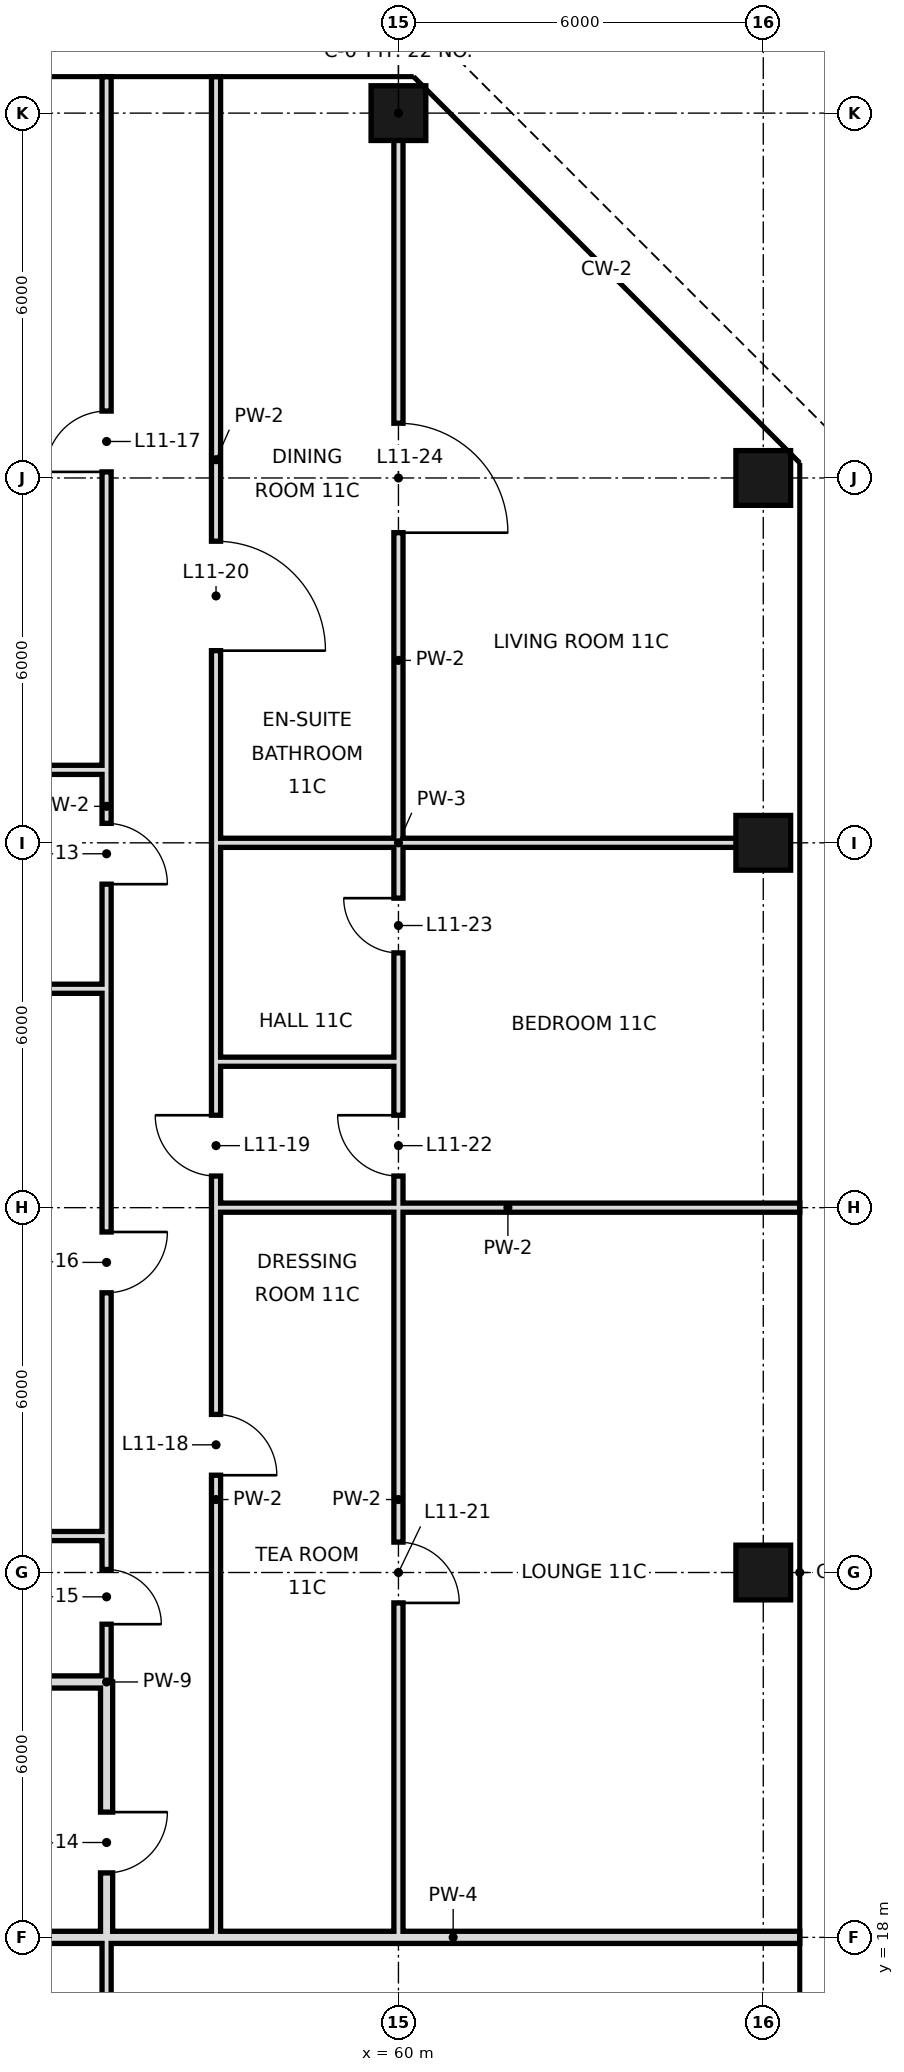
"""IFC4 building model, lengths in metres.
Left out: names, types, materials, properties, quantities, classifications, styles, units other than length and angle.
Written with IfcOpenShell. Run it as: python <this file> out.ifc"""

import sys

from ifc_helpers import new_model, si_unit, direction, frame, frame_2d, origin, origin_2d, place, context, subcontext, project, spatial, rectangle, hollow_rectangle, extrude, element, fill, save


model = new_model("IFC4")
c1 = context("Model", 3, precision=1e-05, world=origin(), true_north=direction((0.0, 1.0)))
c2 = subcontext(c1, "Body", "Model", "MODEL_VIEW")
j1 = project(units=[si_unit("LENGTHUNIT", "METRE"), si_unit("PLANEANGLEUNIT", "RADIAN")], contexts=[c1])
p1 = place(None, origin())
s1 = spatial("IfcSite", under=j1, at=p1, CompositionType="ELEMENT")
p2 = place(p1, origin())
s2 = spatial("IfcBuilding", under=s1, at=p2, CompositionType="ELEMENT")
p3 = place(p2, frame((0.0, 0.0, 60.6)))
s3 = spatial("IfcBuildingStorey", under=s2, at=p3, CompositionType="ELEMENT", Elevation=60.6)
for number, where, z_axis, x_axis in (
    (1, (60.0, 48.0, 0.0), (0.0, 0.0, 1.0), (1.0, 0.0, 0.0)),
    (2, (66.0, 24.0, 0.0), (0.0, 0.0, 1.0), (1.0, 0.0, 0.0)),
    (3, (66.0, 36.0, 0.0), (0.0, 0.0, 1.0), (1.0, 0.0, 0.0)),
    (4, (66.0, 42.0, 0.0), (0.0, 0.0, 1.0), (1.0, 0.0, 0.0)),
):
    element("IfcColumn", number, at=place(p3, frame(where, z_axis=z_axis, x_axis=x_axis)), inside=s3, PredefinedType="COLUMN", context=c2, shape_type="SweptSolid", body=[
        extrude(hollow_rectangle(XDim=0.9, YDim=0.9, WallThickness=0.045, at=origin_2d()), origin(), (0.0, 0.0, 1.0), 3.6),
    ])
p4 = place(p3, frame((55.2, 18.0, 0.0), z_axis=(0.0, 0.0, 1.0), x_axis=(0.0, 1.0, 0.0)))
e5 = element("IfcWall", 5, at=p4, inside=s3, PredefinedType="SOLIDWALL", context=c2, shape_type="SweptSolid", body=[
    extrude(rectangle(XDim=4.2, YDim=0.2, at=frame_2d((2.1, 0.0))), origin(), (0.0, 0.0, 1.0), 2.52),
])
p5 = place(p4, frame((1.06, 0.0, 0.0)))
e6 = element("IfcOpeningElement", 6, at=p5, cuts=e5, PredefinedType="OPENING", context=c2, shape_type="SweptSolid", body=[
    extrude(rectangle(XDim=1.0, YDim=2.4, at=frame_2d((0.5, 1.2))), frame((0.0, 0.11, 0.0), z_axis=(0.0, -1.0, 0.0), x_axis=(1.0, 0.0, 0.0)), (0.0, 0.0, 1.0), 0.22),
])
p6 = place(p3, frame((55.2, 10.8, 0.0), z_axis=(0.0, 0.0, 1.0), x_axis=(0.0, 1.0, 0.0)))
e7 = element("IfcWall", 7, at=p6, inside=s3, PredefinedType="PARTITIONING", context=c2, shape_type="SweptSolid", body=[
    extrude(rectangle(XDim=7.2, YDim=0.15, at=frame_2d((3.6, 0.0))), origin(), (0.0, 0.0, 1.0), 3.42),
])
p7 = place(p3, frame((55.2, 24.6, 0.0), z_axis=(0.0, 0.0, 1.0), x_axis=(0.0, 1.0, 0.0)))
e8 = element("IfcWall", 8, at=p7, inside=s3, PredefinedType="PARTITIONING", context=c2, shape_type="SweptSolid", body=[
    extrude(rectangle(XDim=24.0, YDim=0.15, at=frame_2d((12.0, 0.0))), origin(), (0.0, 0.0, 1.0), 3.42),
])
p8 = place(p7, frame((10.72, 0.0, 0.0)))
e9 = element("IfcOpeningElement", 9, at=p8, cuts=e8, PredefinedType="OPENING", context=c2, shape_type="SweptSolid", body=[
    extrude(rectangle(XDim=1.0, YDim=2.4, at=frame_2d((0.5, 1.2))), frame((0.0, 0.085, 0.0), z_axis=(0.0, -1.0, 0.0), x_axis=(1.0, 0.0, 0.0)), (0.0, 0.0, 1.0), 0.17),
])
p9 = place(p7, frame((4.0, 0.0, 0.0)))
e10 = element("IfcOpeningElement", 10, at=p9, cuts=e8, PredefinedType="OPENING", context=c2, shape_type="SweptSolid", body=[
    extrude(rectangle(XDim=1.0, YDim=2.4, at=frame_2d((0.5, 1.2))), frame((0.0, 0.085, 0.0), z_axis=(0.0, -1.0, 0.0), x_axis=(1.0, 0.0, 0.0)), (0.0, 0.0, 1.0), 0.17),
])
p10 = place(p7, frame((17.5, 0.0, 0.0)))
e11 = element("IfcOpeningElement", 11, at=p10, cuts=e8, PredefinedType="OPENING", context=c2, shape_type="SweptSolid", body=[
    extrude(rectangle(XDim=1.0, YDim=2.4, at=frame_2d((0.5, 1.2))), frame((0.0, 0.085, 0.0), z_axis=(0.0, -1.0, 0.0), x_axis=(1.0, 0.0, 0.0)), (0.0, 0.0, 1.0), 0.17),
])
p11 = place(p3, frame((55.2, 22.2, 0.0), z_axis=(0.0, 0.0, 1.0), x_axis=(0.0, 1.0, 0.0)))
e12 = element("IfcWall", 12, at=p11, inside=s3, PredefinedType="PARTITIONING", context=c2, shape_type="SweptSolid", body=[
    extrude(rectangle(XDim=2.4, YDim=0.15, at=frame_2d((1.2, 0.0))), origin(), (0.0, 0.0, 1.0), 3.42),
])
p12 = place(p11, frame((0.95, 0.0, 0.0)))
e13 = element("IfcOpeningElement", 13, at=p12, cuts=e12, PredefinedType="OPENING", context=c2, shape_type="SweptSolid", body=[
    extrude(rectangle(XDim=0.9, YDim=2.4, at=frame_2d((0.45, 1.2))), frame((0.0, 0.085, 0.0), z_axis=(0.0, -1.0, 0.0), x_axis=(1.0, 0.0, 0.0)), (0.0, 0.0, 1.0), 0.17),
])
p13 = place(p3, frame((57.0, 18.0, 0.0), z_axis=(0.0, 0.0, 1.0), x_axis=(0.0, 1.0, 0.0)))
e14 = element("IfcWall", 14, at=p13, inside=s3, PredefinedType="PARTITIONING", context=c2, shape_type="SweptSolid", body=[
    extrude(rectangle(XDim=14.4, YDim=0.15, at=frame_2d((7.2, 0.0))), origin(), (0.0, 0.0, 1.0), 3.42),
])
p14 = place(p13, frame((7.6, 0.0, 0.0)))
e15 = element("IfcOpeningElement", 15, at=p14, cuts=e14, PredefinedType="OPENING", context=c2, shape_type="SweptSolid", body=[
    extrude(rectangle(XDim=1.0, YDim=2.4, at=frame_2d((0.5, 1.2))), frame((0.0, 0.085, 0.0), z_axis=(0.0, -1.0, 0.0), x_axis=(1.0, 0.0, 0.0)), (0.0, 0.0, 1.0), 0.17),
])
p15 = place(p13, frame((12.52, 0.0, 0.0)))
e16 = element("IfcOpeningElement", 16, at=p15, cuts=e14, PredefinedType="OPENING", context=c2, shape_type="SweptSolid", body=[
    extrude(rectangle(XDim=1.0, YDim=2.4, at=frame_2d((0.5, 1.2))), frame((0.0, 0.085, 0.0), z_axis=(0.0, -1.0, 0.0), x_axis=(1.0, 0.0, 0.0)), (0.0, 0.0, 1.0), 0.17),
])
p16 = place(p3, frame((57.0, 36.0, 0.0), z_axis=(0.0, 0.0, 1.0), x_axis=(0.0, 1.0, 0.0)))
e17 = element("IfcWall", 17, at=p16, inside=s3, PredefinedType="PARTITIONING", context=c2, shape_type="SweptSolid", body=[
    extrude(rectangle(XDim=12.6, YDim=0.15, at=frame_2d((6.3, 0.0))), origin(), (0.0, 0.0, 1.0), 3.42),
])
p17 = place(p16, frame((3.16, 0.0, 0.0)))
e18 = element("IfcOpeningElement", 18, at=p17, cuts=e17, PredefinedType="OPENING", context=c2, shape_type="SweptSolid", body=[
    extrude(rectangle(XDim=1.8, YDim=2.4, at=frame_2d((0.9, 1.2))), frame((0.0, 0.085, 0.0), z_axis=(0.0, -1.0, 0.0), x_axis=(1.0, 0.0, 0.0)), (0.0, 0.0, 1.0), 0.17),
])
p18 = place(p3, frame((57.0, 32.4, 0.0), z_axis=(0.0, 0.0, 1.0), x_axis=(0.0, 1.0, 0.0)))
e19 = element("IfcWall", 19, at=p18, inside=s3, PredefinedType="PARTITIONING", context=c2, shape_type="SweptSolid", body=[
    extrude(rectangle(XDim=3.6, YDim=0.15, at=frame_2d((1.8, 0.0))), origin(), (0.0, 0.0, 1.0), 3.42),
])
p19 = place(p3, frame((60.0, 18.0, 0.0), z_axis=(0.0, 0.0, 1.0), x_axis=(0.0, 1.0, 0.0)))
e20 = element("IfcWall", 20, at=p19, inside=s3, PredefinedType="PARTITIONING", context=c2, shape_type="SweptSolid", body=[
    extrude(rectangle(XDim=14.4, YDim=0.15, at=frame_2d((7.2, 0.0))), origin(), (0.0, 0.0, 1.0), 3.42),
])
p20 = place(p19, frame((5.5, 0.0, 0.0)))
e21 = element("IfcOpeningElement", 21, at=p20, cuts=e20, PredefinedType="OPENING", context=c2, shape_type="SweptSolid", body=[
    extrude(rectangle(XDim=1.0, YDim=2.4, at=frame_2d((0.5, 1.2))), frame((0.0, 0.085, 0.0), z_axis=(0.0, -1.0, 0.0), x_axis=(1.0, 0.0, 0.0)), (0.0, 0.0, 1.0), 0.17),
])
p21 = place(p19, frame((12.52, 0.0, 0.0)))
e22 = element("IfcOpeningElement", 22, at=p21, cuts=e20, PredefinedType="OPENING", context=c2, shape_type="SweptSolid", body=[
    extrude(rectangle(XDim=1.0, YDim=2.4, at=frame_2d((0.5, 1.2))), frame((0.0, 0.085, 0.0), z_axis=(0.0, -1.0, 0.0), x_axis=(1.0, 0.0, 0.0)), (0.0, 0.0, 1.0), 0.17),
])
p22 = place(p3, frame((60.0, 36.0, 0.0), z_axis=(0.0, 0.0, 1.0), x_axis=(0.0, 1.0, 0.0)))
e23 = element("IfcWall", 23, at=p22, inside=s3, PredefinedType="PARTITIONING", context=c2, shape_type="SweptSolid", body=[
    extrude(rectangle(XDim=12.0, YDim=0.15, at=frame_2d((6.0, 0.0))), origin(), (0.0, 0.0, 1.0), 3.42),
])
p23 = place(p22, frame((5.1, 0.0, 0.0)))
e24 = element("IfcOpeningElement", 24, at=p23, cuts=e23, PredefinedType="OPENING", context=c2, shape_type="SweptSolid", body=[
    extrude(rectangle(XDim=1.8, YDim=2.4, at=frame_2d((0.9, 1.2))), frame((0.0, 0.085, 0.0), z_axis=(0.0, -1.0, 0.0), x_axis=(1.0, 0.0, 0.0)), (0.0, 0.0, 1.0), 0.17),
])
p24 = place(p3, frame((60.0, 32.4, 0.0), z_axis=(0.0, 0.0, 1.0), x_axis=(0.0, 1.0, 0.0)))
e25 = element("IfcWall", 25, at=p24, inside=s3, PredefinedType="PARTITIONING", context=c2, shape_type="SweptSolid", body=[
    extrude(rectangle(XDim=3.6, YDim=0.15, at=frame_2d((1.8, 0.0))), origin(), (0.0, 0.0, 1.0), 3.42),
])
p25 = place(p24, frame((1.79, 0.0, 0.0)))
e26 = element("IfcOpeningElement", 26, at=p25, cuts=e25, PredefinedType="OPENING", context=c2, shape_type="SweptSolid", body=[
    extrude(rectangle(XDim=0.9, YDim=2.4, at=frame_2d((0.45, 1.2))), frame((0.0, 0.085, 0.0), z_axis=(0.0, -1.0, 0.0), x_axis=(1.0, 0.0, 0.0)), (0.0, 0.0, 1.0), 0.17),
])
p26 = place(p3, frame((44.9, 18.0, 0.0), z_axis=(0.0, 0.0, 1.0), x_axis=(1.0, 0.0, 0.0)))
e27 = element("IfcWall", 27, at=p26, inside=s3, PredefinedType="SOLIDWALL", context=c2, shape_type="SweptSolid", body=[
    extrude(rectangle(XDim=10.3, YDim=0.2, at=frame_2d((5.15, 0.0))), origin(), (0.0, 0.0, 1.0), 2.52),
])
p27 = place(p3, frame((55.2, 18.0, 0.0), z_axis=(0.0, 0.0, 1.0), x_axis=(1.0, 0.0, 0.0)))
e28 = element("IfcWall", 28, at=p27, inside=s3, PredefinedType="SOLIDWALL", context=c2, shape_type="SweptSolid", body=[
    extrude(rectangle(XDim=11.4, YDim=0.2, at=frame_2d((5.7, 0.0))), origin(), (0.0, 0.0, 1.0), 2.52),
])
p28 = place(p3, frame((44.9, 22.2, 0.0), z_axis=(0.0, 0.0, 1.0), x_axis=(1.0, 0.0, 0.0)))
e29 = element("IfcWall", 29, at=p28, inside=s3, PredefinedType="SOLIDWALL", context=c2, shape_type="SweptSolid", body=[
    extrude(rectangle(XDim=10.3, YDim=0.2, at=frame_2d((5.15, 0.0))), origin(), (0.0, 0.0, 1.0), 2.72),
])
p29 = place(p3, frame((44.9, 24.6, 0.0), z_axis=(0.0, 0.0, 1.0), x_axis=(1.0, 0.0, 0.0)))
e30 = element("IfcWall", 30, at=p29, inside=s3, PredefinedType="PARTITIONING", context=c2, shape_type="SweptSolid", body=[
    extrude(rectangle(XDim=10.3, YDim=0.15, at=frame_2d((5.15, 0.0))), origin(), (0.0, 0.0, 1.0), 3.42),
])
p30 = place(p3, frame((57.0, 30.0, 0.0), z_axis=(0.0, 0.0, 1.0), x_axis=(1.0, 0.0, 0.0)))
e31 = element("IfcWall", 31, at=p30, inside=s3, PredefinedType="PARTITIONING", context=c2, shape_type="SweptSolid", body=[
    extrude(rectangle(XDim=9.6, YDim=0.15, at=frame_2d((4.8, 0.0))), origin(), (0.0, 0.0, 1.0), 2.52),
])
p31 = place(p3, frame((57.0, 32.4, 0.0), z_axis=(0.0, 0.0, 1.0), x_axis=(1.0, 0.0, 0.0)))
e32 = element("IfcWall", 32, at=p31, inside=s3, PredefinedType="PARTITIONING", context=c2, shape_type="SweptSolid", body=[
    extrude(rectangle(XDim=3.0, YDim=0.15, at=frame_2d((1.5, 0.0))), origin(), (0.0, 0.0, 1.0), 3.42),
])
p32 = place(p3, frame((44.9, 33.6, 0.0), z_axis=(0.0, 0.0, 1.0), x_axis=(1.0, 0.0, 0.0)))
e33 = element("IfcWall", 33, at=p32, inside=s3, PredefinedType="PARTITIONING", context=c2, shape_type="SweptSolid", body=[
    extrude(rectangle(XDim=10.3, YDim=0.15, at=frame_2d((5.15, 0.0))), origin(), (0.0, 0.0, 1.0), 3.42),
])
p33 = place(p3, frame((60.0, 36.0, 0.0), z_axis=(0.0, 0.0, 1.0), x_axis=(1.0, 0.0, 0.0)))
e34 = element("IfcWall", 34, at=p33, inside=s3, PredefinedType="PARTITIONING", context=c2, shape_type="SweptSolid", body=[
    extrude(rectangle(XDim=6.0, YDim=0.15, at=frame_2d((3.0, 0.0))), origin(), (0.0, 0.0, 1.0), 2.52),
])
p34 = place(p3, frame((57.0, 36.0, 0.0), z_axis=(0.0, 0.0, 1.0), x_axis=(1.0, 0.0, 0.0)))
e35 = element("IfcWall", 35, at=p34, inside=s3, PredefinedType="PARTITIONING", context=c2, shape_type="SweptSolid", body=[
    extrude(rectangle(XDim=3.0, YDim=0.15, at=frame_2d((1.5, 0.0))), origin(), (0.0, 0.0, 1.0), 2.52),
])
p35 = place(p3, frame((44.9, 37.2, 0.0), z_axis=(0.0, 0.0, 1.0), x_axis=(1.0, 0.0, 0.0)))
e36 = element("IfcWall", 36, at=p35, inside=s3, PredefinedType="PARTITIONING", context=c2, shape_type="SweptSolid", body=[
    extrude(rectangle(XDim=10.3, YDim=0.15, at=frame_2d((5.15, 0.0))), origin(), (0.0, 0.0, 1.0), 3.42),
])
p36 = place(p8, frame((1.0, 0.0, 0.0), z_axis=(0.0, 0.0, 1.0), x_axis=(-1.0, 0.0, 0.0)))
e37 = element("IfcDoor", 37, at=p36, inside=s3, OperationType="SINGLE_SWING_RIGHT", PredefinedType="DOOR", context=c2, shape_type="SweptSolid", body=[
    extrude(rectangle(XDim=1.0, YDim=2.4, at=frame_2d((0.5, 1.2))), frame((0.0, 0.025, 0.0), z_axis=(0.0, -1.0, 0.0), x_axis=(1.0, 0.0, 0.0)), (0.0, 0.0, 1.0), 0.05),
])
fill(e9, e37)
p37 = place(p5, origin())
e38 = element("IfcDoor", 38, at=p37, inside=s3, OperationType="SINGLE_SWING_RIGHT", PredefinedType="DOOR", context=c2, shape_type="SweptSolid", body=[
    extrude(rectangle(XDim=1.0, YDim=2.4, at=frame_2d((0.5, 1.2))), frame((0.0, 0.025, 0.0), z_axis=(0.0, -1.0, 0.0), x_axis=(1.0, 0.0, 0.0)), (0.0, 0.0, 1.0), 0.05),
])
fill(e6, e38)
p38 = place(p12, frame((0.9, 0.0, 0.0), z_axis=(0.0, 0.0, 1.0), x_axis=(-1.0, 0.0, 0.0)))
e39 = element("IfcDoor", 39, at=p38, inside=s3, OperationType="SINGLE_SWING_RIGHT", PredefinedType="DOOR", context=c2, shape_type="SweptSolid", body=[
    extrude(rectangle(XDim=0.9, YDim=2.4, at=frame_2d((0.45, 1.2))), frame((0.0, 0.025, 0.0), z_axis=(0.0, -1.0, 0.0), x_axis=(1.0, 0.0, 0.0)), (0.0, 0.0, 1.0), 0.05),
])
fill(e13, e39)
p39 = place(p9, origin())
e40 = element("IfcDoor", 40, at=p39, inside=s3, OperationType="SINGLE_SWING_RIGHT", PredefinedType="DOOR", context=c2, shape_type="SweptSolid", body=[
    extrude(rectangle(XDim=1.0, YDim=2.4, at=frame_2d((0.5, 1.2))), frame((0.0, 0.025, 0.0), z_axis=(0.0, -1.0, 0.0), x_axis=(1.0, 0.0, 0.0)), (0.0, 0.0, 1.0), 0.05),
])
fill(e10, e40)
p40 = place(p10, origin())
e41 = element("IfcDoor", 41, at=p40, inside=s3, OperationType="SINGLE_SWING_LEFT", PredefinedType="DOOR", context=c2, shape_type="SweptSolid", body=[
    extrude(rectangle(XDim=1.0, YDim=2.4, at=frame_2d((0.5, 1.2))), frame((0.0, 0.025, 0.0), z_axis=(0.0, -1.0, 0.0), x_axis=(1.0, 0.0, 0.0)), (0.0, 0.0, 1.0), 0.05),
])
fill(e11, e41)
p41 = place(p14, frame((1.0, 0.0, 0.0), z_axis=(0.0, 0.0, 1.0), x_axis=(-1.0, 0.0, 0.0)))
e42 = element("IfcDoor", 42, at=p41, inside=s3, OperationType="SINGLE_SWING_RIGHT", PredefinedType="DOOR", context=c2, shape_type="SweptSolid", body=[
    extrude(rectangle(XDim=1.0, YDim=2.4, at=frame_2d((0.5, 1.2))), frame((0.0, 0.025, 0.0), z_axis=(0.0, -1.0, 0.0), x_axis=(1.0, 0.0, 0.0)), (0.0, 0.0, 1.0), 0.05),
])
fill(e15, e42)
p42 = place(p15, frame((1.0, 0.0, 0.0), z_axis=(0.0, 0.0, 1.0), x_axis=(-1.0, 0.0, 0.0)))
e43 = element("IfcDoor", 43, at=p42, inside=s3, OperationType="SINGLE_SWING_LEFT", PredefinedType="DOOR", context=c2, shape_type="SweptSolid", body=[
    extrude(rectangle(XDim=1.0, YDim=2.4, at=frame_2d((0.5, 1.2))), frame((0.0, 0.025, 0.0), z_axis=(0.0, -1.0, 0.0), x_axis=(1.0, 0.0, 0.0)), (0.0, 0.0, 1.0), 0.05),
])
fill(e16, e43)
p43 = place(p17, frame((1.8, 0.0, 0.0), z_axis=(0.0, 0.0, 1.0), x_axis=(-1.0, 0.0, 0.0)))
e44 = element("IfcDoor", 44, at=p43, inside=s3, OperationType="SINGLE_SWING_RIGHT", PredefinedType="DOOR", context=c2, shape_type="SweptSolid", body=[
    extrude(rectangle(XDim=1.8, YDim=2.4, at=frame_2d((0.9, 1.2))), frame((0.0, 0.025, 0.0), z_axis=(0.0, -1.0, 0.0), x_axis=(1.0, 0.0, 0.0)), (0.0, 0.0, 1.0), 0.05),
])
fill(e18, e44)
p44 = place(p20, frame((1.0, 0.0, 0.0), z_axis=(0.0, 0.0, 1.0), x_axis=(-1.0, 0.0, 0.0)))
e45 = element("IfcDoor", 45, at=p44, inside=s3, OperationType="SINGLE_SWING_RIGHT", PredefinedType="DOOR", context=c2, shape_type="SweptSolid", body=[
    extrude(rectangle(XDim=1.0, YDim=2.4, at=frame_2d((0.5, 1.2))), frame((0.0, 0.025, 0.0), z_axis=(0.0, -1.0, 0.0), x_axis=(1.0, 0.0, 0.0)), (0.0, 0.0, 1.0), 0.05),
])
fill(e21, e45)
p45 = place(p21, frame((1.0, 0.0, 0.0), z_axis=(0.0, 0.0, 1.0), x_axis=(-1.0, 0.0, 0.0)))
e46 = element("IfcDoor", 46, at=p45, inside=s3, OperationType="SINGLE_SWING_LEFT", PredefinedType="DOOR", context=c2, shape_type="SweptSolid", body=[
    extrude(rectangle(XDim=1.0, YDim=2.4, at=frame_2d((0.5, 1.2))), frame((0.0, 0.025, 0.0), z_axis=(0.0, -1.0, 0.0), x_axis=(1.0, 0.0, 0.0)), (0.0, 0.0, 1.0), 0.05),
])
fill(e22, e46)
p46 = place(p25, frame((0.9, 0.0, 0.0), z_axis=(0.0, 0.0, 1.0), x_axis=(-1.0, 0.0, 0.0)))
e47 = element("IfcDoor", 47, at=p46, inside=s3, OperationType="SINGLE_SWING_LEFT", PredefinedType="DOOR", context=c2, shape_type="SweptSolid", body=[
    extrude(rectangle(XDim=0.9, YDim=2.4, at=frame_2d((0.45, 1.2))), frame((0.0, 0.025, 0.0), z_axis=(0.0, -1.0, 0.0), x_axis=(1.0, 0.0, 0.0)), (0.0, 0.0, 1.0), 0.05),
])
fill(e26, e47)
p47 = place(p23, frame((1.8, 0.0, 0.0), z_axis=(0.0, 0.0, 1.0), x_axis=(-1.0, 0.0, 0.0)))
e48 = element("IfcDoor", 48, at=p47, inside=s3, OperationType="SINGLE_SWING_RIGHT", PredefinedType="DOOR", context=c2, shape_type="SweptSolid", body=[
    extrude(rectangle(XDim=1.8, YDim=2.4, at=frame_2d((0.9, 1.2))), frame((0.0, 0.025, 0.0), z_axis=(0.0, -1.0, 0.0), x_axis=(1.0, 0.0, 0.0)), (0.0, 0.0, 1.0), 0.05),
])
fill(e24, e48)
save(model, sys.argv[1])
